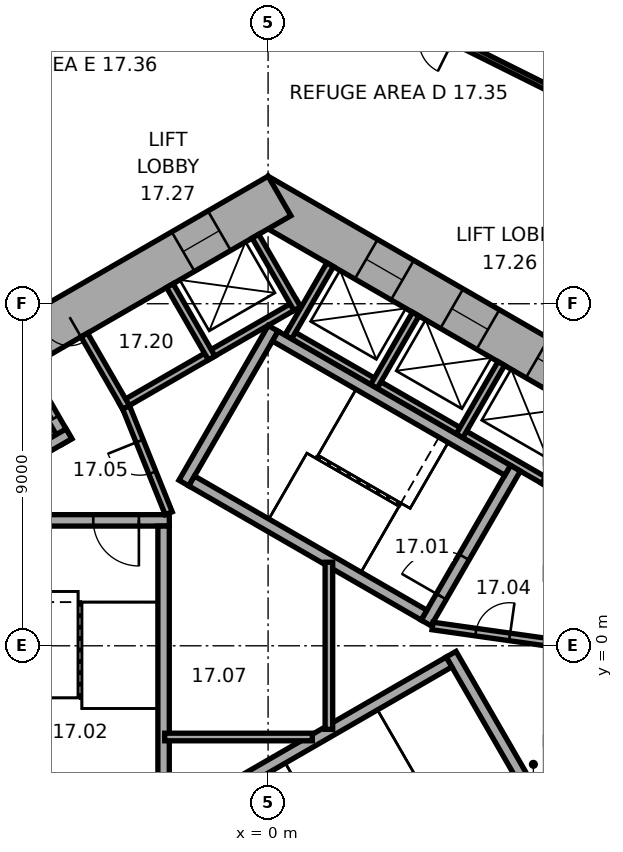
"""IFC4 building model, lengths in metres.
Left out: names, types, materials, properties, quantities, classifications, styles, units other than length and angle.
Written with IfcOpenShell. Run it as: python <this file> out.ifc"""

import sys

from ifc_helpers import new_model, si_unit, direction, frame, frame_2d, origin, place, context, subcontext, project, spatial, rectangle, extrude, element, fill, save


model = new_model("IFC4")
c1 = context("Model", 3, precision=1e-05, world=origin(), true_north=direction((0.0, 1.0)))
c2 = subcontext(c1, "Body", "Model", "MODEL_VIEW")
j1 = project(units=[si_unit("LENGTHUNIT", "METRE"), si_unit("PLANEANGLEUNIT", "RADIAN")], contexts=[c1])
p1 = place(None, origin())
s1 = spatial("IfcSite", under=j1, at=p1, CompositionType="ELEMENT")
p2 = place(p1, origin())
s2 = spatial("IfcBuilding", under=s1, at=p2, CompositionType="ELEMENT")
p3 = place(p2, frame((0.0, 0.0, 77.0)))
s3 = spatial("IfcBuildingStorey", under=s2, at=p3, CompositionType="ELEMENT", Elevation=77.0)
p4 = place(p3, frame((10.4, 5.658, 0.0), z_axis=(0.0, 0.0, 1.0), x_axis=(-0.866021384402, 0.500006961711, 0.0)))
e1 = element("IfcWall", 1, at=p4, inside=s3, PredefinedType="SHEAR", context=c2, shape_type="SweptSolid", body=[
    extrude(rectangle(XDim=12.355, YDim=1.2, at=frame_2d((6.178, 0.0))), origin(), (0.0, 0.0, 1.0), 6.6),
])
p5 = place(p4, frame((2.728, 0.0, 0.0)))
e2 = element("IfcOpeningElement", 2, at=p5, cuts=e1, PredefinedType="OPENING", context=c2, shape_type="SweptSolid", body=[
    extrude(rectangle(XDim=1.1, YDim=2.1, at=frame_2d((0.55, 1.05))), frame((0.0, 0.61, 0.0), z_axis=(0.0, -1.0, 0.0), x_axis=(1.0, 0.0, 0.0)), (0.0, 0.0, 1.0), 1.22),
])
p6 = place(p4, frame((5.328, 0.0, 0.0)))
e3 = element("IfcOpeningElement", 3, at=p6, cuts=e1, PredefinedType="OPENING", context=c2, shape_type="SweptSolid", body=[
    extrude(rectangle(XDim=1.1, YDim=2.1, at=frame_2d((0.55, 1.05))), frame((0.0, 0.61, 0.0), z_axis=(0.0, -1.0, 0.0), x_axis=(1.0, 0.0, 0.0)), (0.0, 0.0, 1.0), 1.22),
])
p7 = place(p4, frame((7.928, 0.0, 0.0)))
e4 = element("IfcOpeningElement", 4, at=p7, cuts=e1, PredefinedType="OPENING", context=c2, shape_type="SweptSolid", body=[
    extrude(rectangle(XDim=1.1, YDim=2.1, at=frame_2d((0.55, 1.05))), frame((0.0, 0.61, 0.0), z_axis=(0.0, -1.0, 0.0), x_axis=(1.0, 0.0, 0.0)), (0.0, 0.0, 1.0), 1.22),
])
p8 = place(p3, frame((0.3, 11.836, 0.0), z_axis=(0.0, 0.0, 1.0), x_axis=(-0.866021384402, -0.500006961711, 0.0)))
e5 = element("IfcWall", 5, at=p8, inside=s3, PredefinedType="SHEAR", context=c2, shape_type="SweptSolid", body=[
    extrude(rectangle(XDim=12.355, YDim=1.2, at=frame_2d((6.178, 0.0))), origin(), (0.0, 0.0, 1.0), 6.6),
])
p9 = place(p8, frame((6.378, 0.0, 0.0)))
e6 = element("IfcOpeningElement", 6, at=p9, cuts=e5, PredefinedType="OPENING", context=c2, shape_type="SweptSolid", body=[
    extrude(rectangle(XDim=1.5, YDim=2.1, at=frame_2d((0.75, 1.05))), frame((0.0, 0.61, 0.0), z_axis=(0.0, -1.0, 0.0), x_axis=(1.0, 0.0, 0.0)), (0.0, 0.0, 1.0), 1.22),
])
p10 = place(p8, frame((1.828, 0.0, 0.0)))
e7 = element("IfcOpeningElement", 7, at=p10, cuts=e5, PredefinedType="OPENING", context=c2, shape_type="SweptSolid", body=[
    extrude(rectangle(XDim=1.1, YDim=2.1, at=frame_2d((0.55, 1.05))), frame((0.0, 0.61, 0.0), z_axis=(0.0, -1.0, 0.0), x_axis=(1.0, 0.0, 0.0)), (0.0, 0.0, 1.0), 1.22),
])
p11 = place(p3, frame((-3.144, 24.801, 0.0), z_axis=(0.0, 0.0, 1.0), x_axis=(-0.866028031259, -0.499995449053, 0.0)))
e8 = element("IfcWall", 8, at=p11, inside=s3, PredefinedType="STANDARD", context=c2, shape_type="SweptSolid", body=[
    extrude(rectangle(XDim=21.237, YDim=0.2, at=frame_2d((10.619, 0.0))), origin(), (0.0, 0.0, 1.0), 6.6),
])
p12 = place(p3, frame((0.113, 18.297, 0.0), z_axis=(0.0, 0.0, 1.0), x_axis=(0.894932628477, -0.446201289204, 0.0)))
e9 = element("IfcWall", 9, at=p12, inside=s3, PredefinedType="STANDARD", context=c2, shape_type="SweptSolid", body=[
    extrude(rectangle(XDim=17.659, YDim=0.15, at=frame_2d((8.83, 0.0))), origin(), (0.0, 0.0, 1.0), 2.6),
])
p13 = place(p12, frame((3.515, 0.0, 0.0)))
e10 = element("IfcOpeningElement", 10, at=p13, cuts=e9, PredefinedType="OPENING", context=c2, shape_type="SweptSolid", body=[
    extrude(rectangle(XDim=1.8, YDim=2.4, at=frame_2d((0.9, 1.2))), frame((0.0, 0.085, 0.0), z_axis=(0.0, -1.0, 0.0), x_axis=(1.0, 0.0, 0.0)), (0.0, 0.0, 1.0), 0.17),
])
p14 = place(p12, frame((12.344, 0.0, 0.0)))
e11 = element("IfcOpeningElement", 11, at=p14, cuts=e9, PredefinedType="OPENING", context=c2, shape_type="SweptSolid", body=[
    extrude(rectangle(XDim=1.8, YDim=2.4, at=frame_2d((0.9, 1.2))), frame((0.0, 0.085, 0.0), z_axis=(0.0, -1.0, 0.0), x_axis=(1.0, 0.0, 0.0)), (0.0, 0.0, 1.0), 0.17),
])
p15 = place(p3, frame((7.424, 4.259, 0.0), z_axis=(0.0, 0.0, 1.0), x_axis=(-0.866026010844, 0.49999894854, 0.0)))
e12 = element("IfcWall", 12, at=p15, inside=s3, PredefinedType="PARTITIONING", context=c2, shape_type="SweptSolid", body=[
    extrude(rectangle(XDim=8.0, YDim=0.2, at=frame_2d((4.0, 0.0))), origin(), (0.0, 0.0, 1.0), 6.35),
])
for number, where, z_axis, x_axis in (
    (13, (7.287, 4.222, 0.0), (0.0, 0.0, 1.0), (0.5, 0.866, 0.0)),
    (14, (5.036, 5.522, 0.0), (0.0, 0.0, 1.0), (0.5, 0.866, 0.0)),
    (15, (2.784, 6.822, 0.0), (0.0, 0.0, 1.0), (0.5, 0.866, 0.0)),
    (16, (0.532, 8.122, 0.0), (0.0, 0.0, 1.0), (0.5, 0.866, 0.0)),
):
    element("IfcWall", number, at=place(p3, frame(where, z_axis=z_axis, x_axis=x_axis)), inside=s3, PredefinedType="PARTITIONING", context=c2, shape_type="SweptSolid", body=[
        extrude(rectangle(XDim=2.2, YDim=0.2, at=frame_2d((1.1, 0.0))), origin(), (0.0, 0.0, 1.0), 6.35),
    ])
p16 = place(p3, frame((0.803, 9.009, 0.0), z_axis=(0.0, 0.0, 1.0), x_axis=(-0.866028230842, -0.499995103361, 0.0)))
e17 = element("IfcWall", 17, at=p16, inside=s3, PredefinedType="PARTITIONING", context=c2, shape_type="SweptSolid", body=[
    extrude(rectangle(XDim=5.4, YDim=0.2, at=frame_2d((2.7, 0.0))), origin(), (0.0, 0.0, 1.0), 6.35),
])
p17 = place(p3, frame((0.767, 8.872, 0.0), z_axis=(0.0, 0.0, 1.0), x_axis=(-0.499994660107, 0.866028486751, 0.0)))
e18 = element("IfcWall", 18, at=p17, inside=s3, PredefinedType="PARTITIONING", context=c2, shape_type="SweptSolid", body=[
    extrude(rectangle(XDim=2.2, YDim=0.2, at=frame_2d((1.1, 0.0))), origin(), (0.0, 0.0, 1.0), 6.35),
])
for number, where, z_axis, x_axis in (
    (19, (-1.485, 7.572, 0.0), (0.0, 0.0, 1.0), (-0.5, 0.866, 0.0)),
    (20, (-3.737, 6.272, 0.0), (0.0, 0.0, 1.0), (-0.5, 0.866, 0.0)),
):
    element("IfcWall", number, at=place(p3, frame(where, z_axis=z_axis, x_axis=x_axis)), inside=s3, PredefinedType="PARTITIONING", context=c2, shape_type="SweptSolid", body=[
        extrude(rectangle(XDim=2.2, YDim=0.2, at=frame_2d((1.1, 0.0))), origin(), (0.0, 0.0, 1.0), 6.35),
    ])
p18 = place(p3, frame((4.158, 0.602, 0.0), z_axis=(0.0, 0.0, 1.0), x_axis=(0.499977259774, 0.866038532462, 0.0)))
e21 = element("IfcWall", 21, at=p18, inside=s3, PredefinedType="SHEAR", context=c2, shape_type="SweptSolid", body=[
    extrude(rectangle(XDim=4.7, YDim=0.3, at=frame_2d((2.35, 0.0))), origin(), (0.0, 0.0, 1.0), 6.35),
])
p19 = place(p18, frame((0.8, 0.0, 0.0)))
e22 = element("IfcOpeningElement", 22, at=p19, cuts=e21, PredefinedType="OPENING", context=c2, shape_type="SweptSolid", body=[
    extrude(rectangle(XDim=1.2, YDim=2.1, at=frame_2d((0.6, 1.05))), frame((0.0, 0.16, 0.0), z_axis=(0.0, -1.0, 0.0), x_axis=(1.0, 0.0, 0.0)), (0.0, 0.0, 1.0), 0.32),
])
p20 = place(p3, frame((-2.216, 4.282, 0.0), z_axis=(0.0, 0.0, 1.0), x_axis=(0.499977259774, 0.866038532462, 0.0)))
e23 = element("IfcWall", 23, at=p20, inside=s3, PredefinedType="SHEAR", context=c2, shape_type="SweptSolid", body=[
    extrude(rectangle(XDim=4.7, YDim=0.3, at=frame_2d((2.35, 0.0))), origin(), (0.0, 0.0, 1.0), 6.35),
])
for number, where, z_axis, x_axis in (
    (24, (4.103, 0.807, 0.0), (0.0, 0.0, 1.0), (-0.866, 0.5, 0.0)),
    (25, (6.303, 4.617, 0.0), (0.0, 0.0, 1.0), (-0.866, 0.5, 0.0)),
):
    element("IfcWall", number, at=place(p3, frame(where, z_axis=z_axis, x_axis=x_axis)), inside=s3, PredefinedType="SHEAR", context=c2, shape_type="SweptSolid", body=[
        extrude(rectangle(XDim=7.06, YDim=0.3, at=frame_2d((3.53, 0.0))), origin(), (0.0, 0.0, 1.0), 6.35),
    ])
p21 = place(p3, frame((-2.6, 3.3, 0.0), z_axis=(0.0, 0.0, 1.0), x_axis=(-1.0, 0.0, 0.0)))
e26 = element("IfcWall", 26, at=p21, inside=s3, PredefinedType="SHEAR", context=c2, shape_type="SweptSolid", body=[
    extrude(rectangle(XDim=4.7, YDim=0.3, at=frame_2d((2.35, 0.0))), origin(), (0.0, 0.0, 1.0), 6.35),
])
p22 = place(p21, frame((0.8, 0.0, 0.0)))
e27 = element("IfcOpeningElement", 27, at=p22, cuts=e26, PredefinedType="OPENING", context=c2, shape_type="SweptSolid", body=[
    extrude(rectangle(XDim=1.2, YDim=2.1, at=frame_2d((0.6, 1.05))), frame((0.0, 0.16, 0.0), z_axis=(0.0, -1.0, 0.0), x_axis=(1.0, 0.0, 0.0)), (0.0, 0.0, 1.0), 0.32),
])
p23 = place(p3, frame((-2.75, 3.15, 0.0), z_axis=(0.0, 0.0, 1.0), x_axis=(0.0, -1.0, 0.0)))
e28 = element("IfcWall", 28, at=p23, inside=s3, PredefinedType="SHEAR", context=c2, shape_type="SweptSolid", body=[
    extrude(rectangle(XDim=7.06, YDim=0.3, at=frame_2d((3.53, 0.0))), origin(), (0.0, 0.0, 1.0), 6.35),
])
p24 = place(p3, frame((4.816, -0.222, 0.0), z_axis=(0.0, 0.0, 1.0), x_axis=(0.499977259774, -0.866038532462, 0.0)))
e29 = element("IfcWall", 29, at=p24, inside=s3, PredefinedType="SHEAR", context=c2, shape_type="SweptSolid", body=[
    extrude(rectangle(XDim=4.7, YDim=0.3, at=frame_2d((2.35, 0.0))), origin(), (0.0, 0.0, 1.0), 6.35),
])
p25 = place(p3, frame((-1.353, -3.957, 0.0), z_axis=(0.0, 0.0, 1.0), x_axis=(0.866027801685, 0.499995846692, 0.0)))
e30 = element("IfcWall", 30, at=p25, inside=s3, PredefinedType="SHEAR", context=c2, shape_type="SweptSolid", body=[
    extrude(rectangle(XDim=7.06, YDim=0.3, at=frame_2d((3.53, 0.0))), origin(), (0.0, 0.0, 1.0), 6.35),
])
p26 = place(p3, frame((4.327, 0.521, 0.0), z_axis=(0.0, 0.0, 1.0), x_axis=(0.990124376366, -0.14019172346, 0.0)))
e31 = element("IfcWall", 31, at=p26, inside=s3, PredefinedType="PARTITIONING", context=c2, shape_type="SweptSolid", body=[
    extrude(rectangle(XDim=3.002, YDim=0.2, at=frame_2d((1.501, 0.0))), origin(), (0.0, 0.0, 1.0), 6.35),
])
p27 = place(p26, frame((1.15, 0.0, 0.0)))
e32 = element("IfcOpeningElement", 32, at=p27, cuts=e31, PredefinedType="OPENING", context=c2, shape_type="SweptSolid", body=[
    extrude(rectangle(XDim=0.9, YDim=2.1, at=frame_2d((0.45, 1.05))), frame((0.0, 0.11, 0.0), z_axis=(0.0, -1.0, 0.0), x_axis=(1.0, 0.0, 0.0)), (0.0, 0.0, 1.0), 0.22),
])
p28 = place(p3, frame((-5.295, 5.372, 0.0), z_axis=(0.0, 0.0, 1.0), x_axis=(-0.500077893725, 0.86598042715, 0.0)))
e33 = element("IfcWall", 33, at=p28, inside=s3, PredefinedType="SHEAR", context=c2, shape_type="SweptSolid", body=[
    extrude(rectangle(XDim=2.2, YDim=0.3, at=frame_2d((1.1, 0.0))), origin(), (0.0, 0.0, 1.0), 6.35),
])
p29 = place(p28, frame((0.7, 0.0, 0.0)))
e34 = element("IfcOpeningElement", 34, at=p29, cuts=e33, PredefinedType="OPENING", context=c2, shape_type="SweptSolid", body=[
    extrude(rectangle(XDim=1.1, YDim=2.1, at=frame_2d((0.55, 1.05))), frame((0.0, 0.16, 0.0), z_axis=(0.0, -1.0, 0.0), x_axis=(1.0, 0.0, 0.0)), (0.0, 0.0, 1.0), 0.32),
])
p30 = place(p3, frame((-5.24, 5.577, 0.0), z_axis=(0.0, 0.0, 1.0), x_axis=(-0.866014461049, -0.500018952895, 0.0)))
e35 = element("IfcWall", 35, at=p30, inside=s3, PredefinedType="SHEAR", context=c2, shape_type="SweptSolid", body=[
    extrude(rectangle(XDim=3.35, YDim=0.3, at=frame_2d((1.675, 0.0))), origin(), (0.0, 0.0, 1.0), 6.35),
])
p31 = place(p3, frame((-2.615, 3.487, 0.0), z_axis=(0.0, 0.0, 1.0), x_axis=(-0.373576831041, 0.92759924068, 0.0)))
e36 = element("IfcWall", 36, at=p31, inside=s3, PredefinedType="PARTITIONING", context=c2, shape_type="SweptSolid", body=[
    extrude(rectangle(XDim=3.002, YDim=0.2, at=frame_2d((1.501, 0.0))), origin(), (0.0, 0.0, 1.0), 6.35),
])
p32 = place(p31, frame((1.15, 0.0, 0.0)))
e37 = element("IfcOpeningElement", 37, at=p32, cuts=e36, PredefinedType="OPENING", context=c2, shape_type="SweptSolid", body=[
    extrude(rectangle(XDim=0.9, YDim=2.1, at=frame_2d((0.45, 1.05))), frame((0.0, 0.11, 0.0), z_axis=(0.0, -1.0, 0.0), x_axis=(1.0, 0.0, 0.0)), (0.0, 0.0, 1.0), 0.22),
])
p33 = place(p3, frame((-2.72, -2.4, 0.0), z_axis=(0.0, 0.0, 1.0), x_axis=(1.0, 0.0, 0.0)))
e38 = element("IfcWall", 38, at=p33, inside=s3, PredefinedType="PARTITIONING", context=c2, shape_type="SweptSolid", body=[
    extrude(rectangle(XDim=3.883, YDim=0.2, at=frame_2d((1.941, 0.0))), origin(), (0.0, 0.0, 1.0), 6.35),
])
p34 = place(p3, frame((1.6, -2.198, 0.0), z_axis=(0.0, 0.0, 1.0), x_axis=(0.0, 1.0, 0.0)))
e39 = element("IfcWall", 39, at=p34, inside=s3, PredefinedType="PARTITIONING", context=c2, shape_type="SweptSolid", body=[
    extrude(rectangle(XDim=4.397, YDim=0.2, at=frame_2d((2.198, 0.0))), origin(), (0.0, 0.0, 1.0), 6.35),
])
p35 = place(p9, origin())
e40 = element("IfcDoor", 40, at=p35, inside=s3, OperationType="DOUBLE_DOOR_SINGLE_SWING", PredefinedType="DOOR", context=c2, shape_type="SweptSolid", body=[
    extrude(rectangle(XDim=1.5, YDim=2.1, at=frame_2d((0.75, 1.05))), frame((0.0, 0.025, 0.0), z_axis=(0.0, -1.0, 0.0), x_axis=(1.0, 0.0, 0.0)), (0.0, 0.0, 1.0), 0.05),
])
fill(e6, e40)
p36 = place(p19, origin())
e41 = element("IfcDoor", 41, at=p36, inside=s3, OperationType="SINGLE_SWING_RIGHT", PredefinedType="DOOR", context=c2, shape_type="SweptSolid", body=[
    extrude(rectangle(XDim=1.2, YDim=2.1, at=frame_2d((0.6, 1.05))), frame((0.0, 0.025, 0.0), z_axis=(0.0, -1.0, 0.0), x_axis=(1.0, 0.0, 0.0)), (0.0, 0.0, 1.0), 0.05),
])
fill(e22, e41)
p37 = place(p22, origin())
e42 = element("IfcDoor", 42, at=p37, inside=s3, OperationType="SINGLE_SWING_RIGHT", PredefinedType="DOOR", context=c2, shape_type="SweptSolid", body=[
    extrude(rectangle(XDim=1.2, YDim=2.1, at=frame_2d((0.6, 1.05))), frame((0.0, 0.025, 0.0), z_axis=(0.0, -1.0, 0.0), x_axis=(1.0, 0.0, 0.0)), (0.0, 0.0, 1.0), 0.05),
])
fill(e27, e42)
p38 = place(p27, origin())
e43 = element("IfcDoor", 43, at=p38, inside=s3, OperationType="SINGLE_SWING_LEFT", PredefinedType="DOOR", context=c2, shape_type="SweptSolid", body=[
    extrude(rectangle(XDim=0.9, YDim=2.1, at=frame_2d((0.45, 1.05))), frame((0.0, 0.025, 0.0), z_axis=(0.0, -1.0, 0.0), x_axis=(1.0, 0.0, 0.0)), (0.0, 0.0, 1.0), 0.05),
])
fill(e32, e43)
p39 = place(p32, origin())
e44 = element("IfcDoor", 44, at=p39, inside=s3, OperationType="SINGLE_SWING_LEFT", PredefinedType="DOOR", context=c2, shape_type="SweptSolid", body=[
    extrude(rectangle(XDim=0.9, YDim=2.1, at=frame_2d((0.45, 1.05))), frame((0.0, 0.025, 0.0), z_axis=(0.0, -1.0, 0.0), x_axis=(1.0, 0.0, 0.0)), (0.0, 0.0, 1.0), 0.05),
])
fill(e37, e44)
p40 = place(p29, origin())
e45 = element("IfcDoor", 45, at=p40, inside=s3, OperationType="DOUBLE_DOOR_SLIDING", PredefinedType="DOOR", context=c2, shape_type="SweptSolid", body=[
    extrude(rectangle(XDim=1.1, YDim=2.1, at=frame_2d((0.55, 1.05))), frame((0.0, 0.025, 0.0), z_axis=(0.0, -1.0, 0.0), x_axis=(1.0, 0.0, 0.0)), (0.0, 0.0, 1.0), 0.05),
])
fill(e34, e45)
p41 = place(p5, origin())
e46 = element("IfcDoor", 46, at=p41, inside=s3, OperationType="DOUBLE_DOOR_SLIDING", PredefinedType="DOOR", context=c2, shape_type="SweptSolid", body=[
    extrude(rectangle(XDim=1.1, YDim=2.1, at=frame_2d((0.55, 1.05))), frame((0.0, 0.025, 0.0), z_axis=(0.0, -1.0, 0.0), x_axis=(1.0, 0.0, 0.0)), (0.0, 0.0, 1.0), 0.05),
])
fill(e2, e46)
p42 = place(p6, origin())
e47 = element("IfcDoor", 47, at=p42, inside=s3, OperationType="DOUBLE_DOOR_SLIDING", PredefinedType="DOOR", context=c2, shape_type="SweptSolid", body=[
    extrude(rectangle(XDim=1.1, YDim=2.1, at=frame_2d((0.55, 1.05))), frame((0.0, 0.025, 0.0), z_axis=(0.0, -1.0, 0.0), x_axis=(1.0, 0.0, 0.0)), (0.0, 0.0, 1.0), 0.05),
])
fill(e3, e47)
p43 = place(p7, origin())
e48 = element("IfcDoor", 48, at=p43, inside=s3, OperationType="DOUBLE_DOOR_SLIDING", PredefinedType="DOOR", context=c2, shape_type="SweptSolid", body=[
    extrude(rectangle(XDim=1.1, YDim=2.1, at=frame_2d((0.55, 1.05))), frame((0.0, 0.025, 0.0), z_axis=(0.0, -1.0, 0.0), x_axis=(1.0, 0.0, 0.0)), (0.0, 0.0, 1.0), 0.05),
])
fill(e4, e48)
p44 = place(p10, origin())
e49 = element("IfcDoor", 49, at=p44, inside=s3, OperationType="DOUBLE_DOOR_SLIDING", PredefinedType="DOOR", context=c2, shape_type="SweptSolid", body=[
    extrude(rectangle(XDim=1.1, YDim=2.1, at=frame_2d((0.55, 1.05))), frame((0.0, 0.025, 0.0), z_axis=(0.0, -1.0, 0.0), x_axis=(1.0, 0.0, 0.0)), (0.0, 0.0, 1.0), 0.05),
])
fill(e7, e49)
save(model, sys.argv[1])
